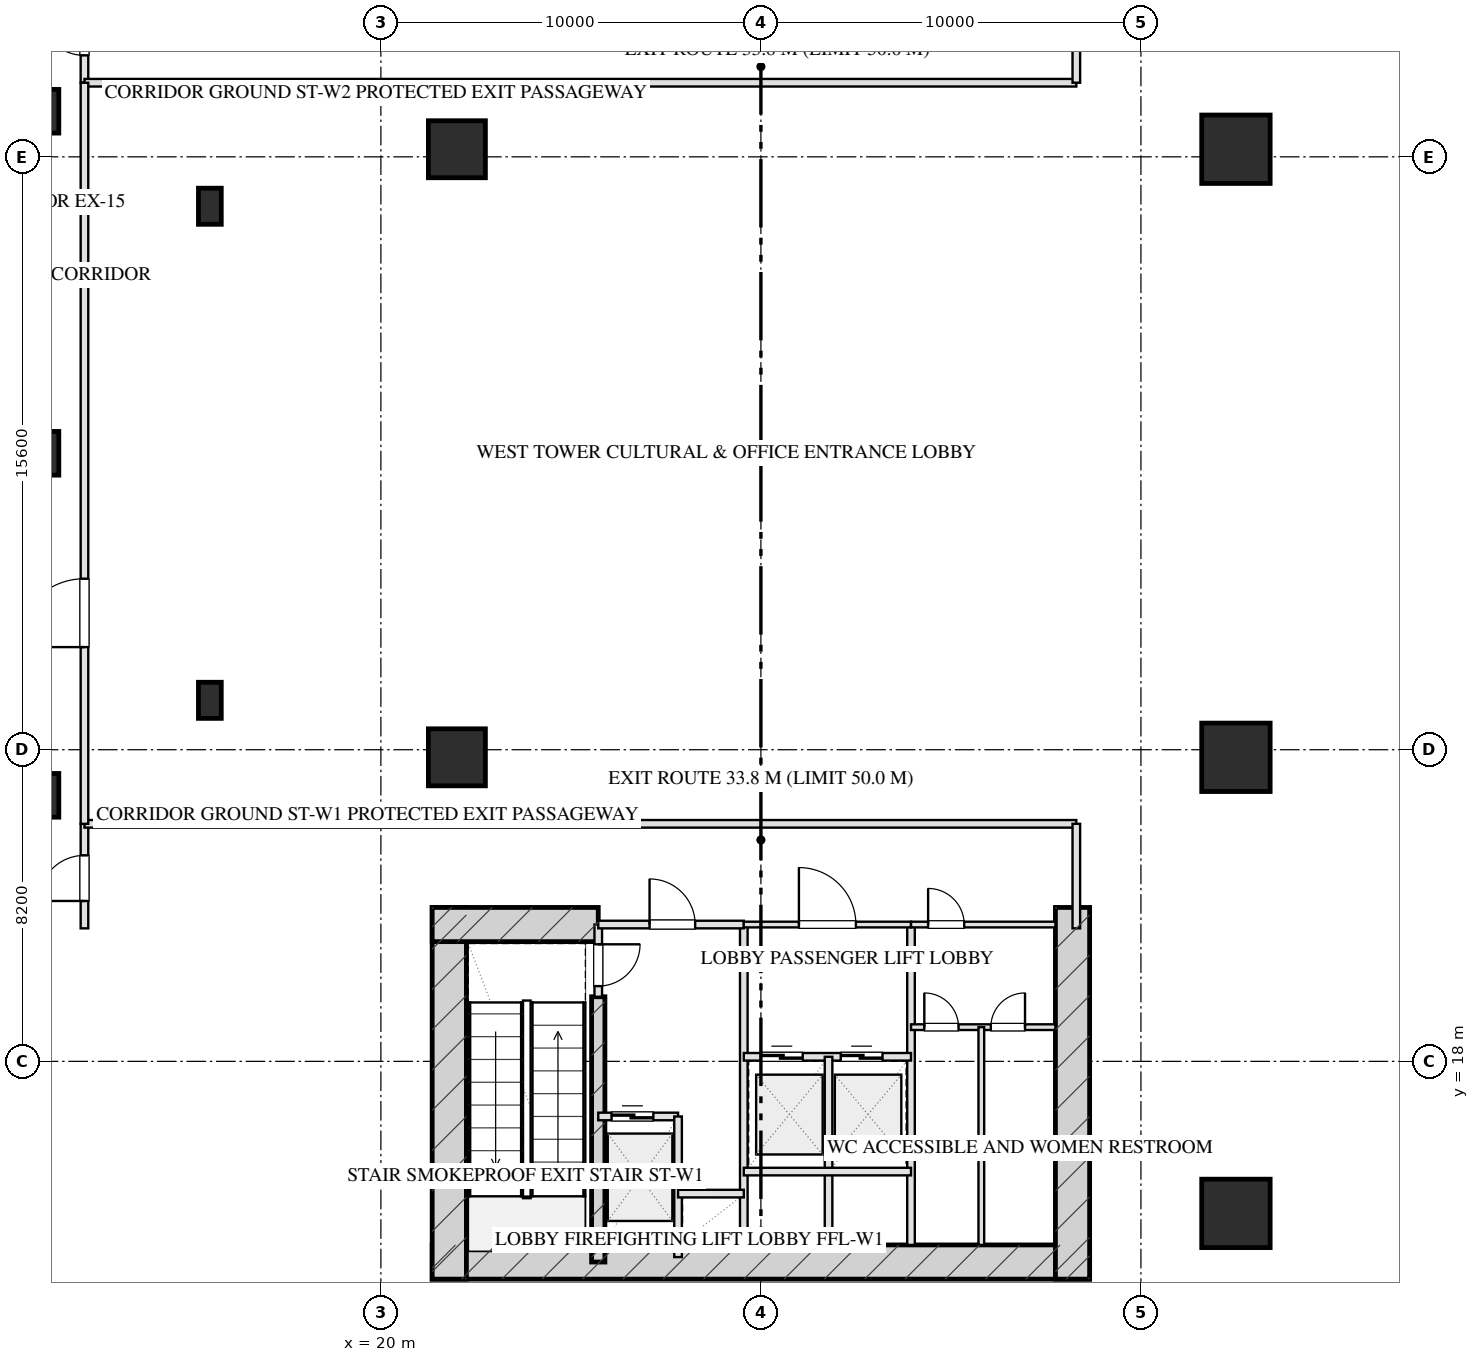
"""IFC4 building model, lengths in metres.
Left out: names, types, materials, properties, quantities, classifications, styles, units other than length and angle.
Written with IfcOpenShell. Run it as: python <this file> out.ifc"""

import sys

from ifc_helpers import new_model, si_unit, direction, frame, frame_2d, origin, origin_2d, place, context, subcontext, project, spatial, rectangle, hollow_rectangle, extrude, element, fill, save


model = new_model("IFC4")
c1 = context("Model", 3, precision=1e-05, world=origin(), true_north=direction((0.0, 1.0)))
c2 = subcontext(c1, "Body", "Model", "MODEL_VIEW")
j1 = project(units=[si_unit("LENGTHUNIT", "METRE"), si_unit("PLANEANGLEUNIT", "RADIAN")], contexts=[c1])
p1 = place(None, origin())
s1 = spatial("IfcSite", under=j1, at=p1, CompositionType="ELEMENT")
p2 = place(p1, origin())
s2 = spatial("IfcBuilding", under=s1, at=p2, CompositionType="ELEMENT")
p3 = place(p2, origin())
s3 = spatial("IfcBuildingStorey", under=s2, at=p3, CompositionType="ELEMENT", Elevation=0.0)
p4 = place(p3, frame((21.35, 12.72, 0.0), z_axis=(0.0, 0.0, 1.0), x_axis=(1.0, 0.0, 0.0)))
e1 = element("IfcWall", 1, at=p4, inside=s3, PredefinedType="SHEAR", context=c2, shape_type="SweptSolid", body=[
    extrude(rectangle(XDim=17.3, YDim=0.9, at=frame_2d((8.65, 0.0))), origin(), (0.0, 0.0, 1.0), 6.0),
])
for number, where, z_axis, x_axis in (
    (2, (21.8, 22.05, 0.0), (0.0, 0.0, 1.0), (0.0, -1.0, 0.0)),
    (3, (38.2, 22.05, 0.0), (0.0, 0.0, 1.0), (0.0, -1.0, 0.0)),
):
    element("IfcWall", number, at=place(p3, frame(where, z_axis=z_axis, x_axis=x_axis)), inside=s3, PredefinedType="SHEAR", context=c2, shape_type="SweptSolid", body=[
        extrude(rectangle(XDim=9.78, YDim=0.9, at=frame_2d((4.89, 0.0))), origin(), (0.0, 0.0, 1.0), 6.0),
    ])
p5 = place(p3, frame((25.72, 19.7, 0.0), z_axis=(0.0, 0.0, 1.0), x_axis=(0.0, -1.0, 0.0)))
e4 = element("IfcWall", 4, at=p5, inside=s3, PredefinedType="SHEAR", context=c2, shape_type="SweptSolid", body=[
    extrude(rectangle(XDim=6.98, YDim=0.35, at=frame_2d((3.49, 0.0))), origin(), (0.0, 0.0, 1.0), 6.0),
])
p6 = place(p3, frame((21.35, 21.6, 0.0), z_axis=(0.0, 0.0, 1.0), x_axis=(1.0, 0.0, 0.0)))
e5 = element("IfcWall", 5, at=p6, inside=s3, PredefinedType="SHEAR", context=c2, shape_type="SweptSolid", body=[
    extrude(rectangle(XDim=4.37, YDim=0.9, at=frame_2d((2.185, 0.0))), origin(), (0.0, 0.0, 1.0), 6.0),
])
for number, where, z_axis, x_axis in (
    (6, (22.0, 26.0, 0.0), (0.0, 0.0, 1.0), (1.0, 0.0, 0.0)),
    (7, (22.0, 42.0, 0.0), (0.0, 0.0, 1.0), (1.0, 0.0, 0.0)),
):
    element("IfcColumn", number, at=place(p3, frame(where, z_axis=z_axis, x_axis=x_axis)), inside=s3, PredefinedType="COLUMN", context=c2, shape_type="SweptSolid", body=[
        extrude(rectangle(XDim=1.5, YDim=1.5, at=origin_2d()), origin(), (0.0, 0.0, 1.0), 6.001),
    ])
for number, where, z_axis, x_axis in (
    (8, (42.5, 14.0, 0.0), (0.0, 0.0, 1.0), (1.0, 0.0, 0.0)),
    (9, (42.5, 26.0, 0.0), (0.0, 0.0, 1.0), (1.0, 0.0, 0.0)),
    (10, (42.5, 42.0, 0.0), (0.0, 0.0, 1.0), (1.0, 0.0, 0.0)),
):
    element("IfcColumn", number, at=place(p3, frame(where, z_axis=z_axis, x_axis=x_axis)), inside=s3, PredefinedType="COLUMN", context=c2, shape_type="SweptSolid", body=[
        extrude(hollow_rectangle(XDim=1.8, YDim=1.8, WallThickness=0.06, at=origin_2d()), origin(), (0.0, 0.0, 1.0), 6.001),
    ])
for number, where, z_axis, x_axis in (
    (11, (10.95, 25.0, 0.0), (0.0, 0.0, 1.0), (1.0, 0.0, 0.0)),
    (12, (10.95, 34.0, 0.0), (0.0, 0.0, 1.0), (1.0, 0.0, 0.0)),
    (13, (10.95, 43.0, 0.0), (0.0, 0.0, 1.0), (1.0, 0.0, 0.0)),
):
    element("IfcColumn", number, at=place(p3, frame(where, z_axis=z_axis, x_axis=x_axis)), inside=s3, PredefinedType="COLUMN", context=c2, shape_type="SweptSolid", body=[
        extrude(hollow_rectangle(XDim=1.15, YDim=1.15, WallThickness=0.04, at=origin_2d()), origin(), (0.0, 0.0, 1.0), 6.001),
    ])
for number, where, z_axis, x_axis in (
    (14, (15.5, 27.5, 0.0), (0.0, 0.0, 1.0), (1.0, 0.0, 0.0)),
    (15, (15.5, 40.5, 0.0), (0.0, 0.0, 1.0), (1.0, 0.0, 0.0)),
):
    element("IfcColumn", number, at=place(p3, frame(where, z_axis=z_axis, x_axis=x_axis)), inside=s3, PredefinedType="PILASTER", context=c2, shape_type="SweptSolid", body=[
        extrude(rectangle(XDim=0.6, YDim=0.95, at=origin_2d()), origin(), (0.0, 0.0, 1.0), 6.001),
    ])
p7 = place(p3, frame((25.72, 21.6, 0.0), z_axis=(0.0, 0.0, 1.0), x_axis=(0.0, -1.0, 0.0)))
e16 = element("IfcWall", 16, at=p7, inside=s3, PredefinedType="PARTITIONING", context=c2, shape_type="SweptSolid", body=[
    extrude(rectangle(XDim=1.9, YDim=0.2, at=frame_2d((0.95, 0.0))), origin(), (0.0, 0.0, 1.0), 5.685),
])
p8 = place(p7, frame((0.52, 0.0, 0.0)))
e17 = element("IfcOpeningElement", 17, at=p8, cuts=e16, PredefinedType="OPENING", context=c2, shape_type="SweptSolid", body=[
    extrude(rectangle(XDim=1.1, YDim=2.05, at=frame_2d((0.55, 1.025))), frame((0.0, 0.11, 0.0), z_axis=(0.0, -1.0, 0.0), x_axis=(1.0, 0.0, 0.0)), (0.0, 0.0, 1.0), 0.22),
])
p9 = place(p3, frame((29.55, 21.6, 0.0), z_axis=(0.0, 0.0, 1.0), x_axis=(0.0, -1.0, 0.0)))
e18 = element("IfcWall", 18, at=p9, inside=s3, PredefinedType="PARTITIONING", context=c2, shape_type="SweptSolid", body=[
    extrude(rectangle(XDim=8.43, YDim=0.2, at=frame_2d((4.215, 0.0))), origin(), (0.0, 0.0, 1.0), 5.685),
])
p10 = place(p3, frame((25.72, 21.6, 0.0), z_axis=(0.0, 0.0, 1.0), x_axis=(1.0, 0.0, 0.0)))
e19 = element("IfcWall", 19, at=p10, inside=s3, PredefinedType="PARTITIONING", context=c2, shape_type="SweptSolid", body=[
    extrude(rectangle(XDim=3.83, YDim=0.2, at=frame_2d((1.915, 0.0))), origin(), (0.0, 0.0, 1.0), 5.685),
])
p11 = place(p10, frame((1.35, 0.0, 0.0)))
e20 = element("IfcOpeningElement", 20, at=p11, cuts=e19, PredefinedType="OPENING", context=c2, shape_type="SweptSolid", body=[
    extrude(rectangle(XDim=1.2, YDim=2.05, at=frame_2d((0.6, 1.025))), frame((0.0, 0.11, 0.0), z_axis=(0.0, -1.0, 0.0), x_axis=(1.0, 0.0, 0.0)), (0.0, 0.0, 1.0), 0.22),
])
p12 = place(p3, frame((25.72, 16.55, 0.0), z_axis=(0.0, 0.0, 1.0), x_axis=(1.0, 0.0, 0.0)))
e21 = element("IfcWall", 21, at=p12, inside=s3, PredefinedType="PARTITIONING", context=c2, shape_type="SweptSolid", body=[
    extrude(rectangle(XDim=2.1, YDim=0.2, at=frame_2d((1.05, 0.0))), origin(), (0.0, 0.0, 1.0), 5.685),
])
p13 = place(p12, frame((0.35, 0.0, 0.0)))
e22 = element("IfcOpeningElement", 22, at=p13, cuts=e21, PredefinedType="OPENING", context=c2, shape_type="SweptSolid", body=[
    extrude(rectangle(XDim=1.1, YDim=2.05, at=frame_2d((0.55, 1.025))), frame((0.0, 0.11, 0.0), z_axis=(0.0, -1.0, 0.0), x_axis=(1.0, 0.0, 0.0)), (0.0, 0.0, 1.0), 0.22),
])
p14 = place(p3, frame((27.82, 16.55, 0.0), z_axis=(0.0, 0.0, 1.0), x_axis=(0.0, -1.0, 0.0)))
e23 = element("IfcWall", 23, at=p14, inside=s3, PredefinedType="PARTITIONING", context=c2, shape_type="SweptSolid", body=[
    extrude(rectangle(XDim=3.7, YDim=0.2, at=frame_2d((1.85, 0.0))), origin(), (0.0, 0.0, 1.0), 5.685),
])
p15 = place(p3, frame((27.82, 14.52, 0.0), z_axis=(0.0, 0.0, 1.0), x_axis=(1.0, 0.0, 0.0)))
e24 = element("IfcWall", 24, at=p15, inside=s3, PredefinedType="PARTITIONING", context=c2, shape_type="SweptSolid", body=[
    extrude(rectangle(XDim=1.73, YDim=0.2, at=frame_2d((0.865, 0.0))), origin(), (0.0, 0.0, 1.0), 5.685),
])
p16 = place(p3, frame((33.95, 21.6, 0.0), z_axis=(0.0, 0.0, 1.0), x_axis=(0.0, -1.0, 0.0)))
e25 = element("IfcWall", 25, at=p16, inside=s3, PredefinedType="PARTITIONING", context=c2, shape_type="SweptSolid", body=[
    extrude(rectangle(XDim=8.43, YDim=0.2, at=frame_2d((4.215, 0.0))), origin(), (0.0, 0.0, 1.0), 5.685),
])
p17 = place(p3, frame((29.55, 21.6, 0.0), z_axis=(0.0, 0.0, 1.0), x_axis=(1.0, 0.0, 0.0)))
e26 = element("IfcWall", 26, at=p17, inside=s3, PredefinedType="PARTITIONING", context=c2, shape_type="SweptSolid", body=[
    extrude(rectangle(XDim=4.4, YDim=0.15, at=frame_2d((2.2, 0.0))), origin(), (0.0, 0.0, 1.0), 5.685),
])
p18 = place(p17, frame((1.45, 0.0, 0.0)))
e27 = element("IfcOpeningElement", 27, at=p18, cuts=e26, PredefinedType="OPENING", context=c2, shape_type="SweptSolid", body=[
    extrude(rectangle(XDim=1.5, YDim=2.05, at=frame_2d((0.75, 1.025))), frame((0.0, 0.085, 0.0), z_axis=(0.0, -1.0, 0.0), x_axis=(1.0, 0.0, 0.0)), (0.0, 0.0, 1.0), 0.17),
])
p19 = place(p3, frame((29.55, 18.12, 0.0), z_axis=(0.0, 0.0, 1.0), x_axis=(1.0, 0.0, 0.0)))
e28 = element("IfcWall", 28, at=p19, inside=s3, PredefinedType="PARTITIONING", context=c2, shape_type="SweptSolid", body=[
    extrude(rectangle(XDim=4.4, YDim=0.2, at=frame_2d((2.2, 0.0))), origin(), (0.0, 0.0, 1.0), 5.685),
])
p20 = place(p19, frame((0.45, 0.0, 0.0)))
e29 = element("IfcOpeningElement", 29, at=p20, cuts=e28, PredefinedType="OPENING", context=c2, shape_type="SweptSolid", body=[
    extrude(rectangle(XDim=1.1, YDim=2.05, at=frame_2d((0.55, 1.025))), frame((0.0, 0.11, 0.0), z_axis=(0.0, -1.0, 0.0), x_axis=(1.0, 0.0, 0.0)), (0.0, 0.0, 1.0), 0.22),
])
p21 = place(p19, frame((2.55, 0.0, 0.0)))
e30 = element("IfcOpeningElement", 30, at=p21, cuts=e28, PredefinedType="OPENING", context=c2, shape_type="SweptSolid", body=[
    extrude(rectangle(XDim=1.1, YDim=2.05, at=frame_2d((0.55, 1.025))), frame((0.0, 0.11, 0.0), z_axis=(0.0, -1.0, 0.0), x_axis=(1.0, 0.0, 0.0)), (0.0, 0.0, 1.0), 0.22),
])
p22 = place(p3, frame((31.78, 18.12, 0.0), z_axis=(0.0, 0.0, 1.0), x_axis=(0.0, -1.0, 0.0)))
e31 = element("IfcWall", 31, at=p22, inside=s3, PredefinedType="PARTITIONING", context=c2, shape_type="SweptSolid", body=[
    extrude(rectangle(XDim=4.95, YDim=0.2, at=frame_2d((2.475, 0.0))), origin(), (0.0, 0.0, 1.0), 5.685),
])
p23 = place(p3, frame((29.55, 15.1, 0.0), z_axis=(0.0, 0.0, 1.0), x_axis=(1.0, 0.0, 0.0)))
e32 = element("IfcWall", 32, at=p23, inside=s3, PredefinedType="PARTITIONING", context=c2, shape_type="SweptSolid", body=[
    extrude(rectangle(XDim=4.4, YDim=0.2, at=frame_2d((2.2, 0.0))), origin(), (0.0, 0.0, 1.0), 5.685),
])
p24 = place(p3, frame((33.95, 21.6, 0.0), z_axis=(0.0, 0.0, 1.0), x_axis=(1.0, 0.0, 0.0)))
e33 = element("IfcWall", 33, at=p24, inside=s3, PredefinedType="PARTITIONING", context=c2, shape_type="SweptSolid", body=[
    extrude(rectangle(XDim=3.8, YDim=0.15, at=frame_2d((1.9, 0.0))), origin(), (0.0, 0.0, 1.0), 5.685),
])
p25 = place(p24, frame((0.45, 0.0, 0.0)))
e34 = element("IfcOpeningElement", 34, at=p25, cuts=e33, PredefinedType="OPENING", context=c2, shape_type="SweptSolid", body=[
    extrude(rectangle(XDim=0.95, YDim=2.05, at=frame_2d((0.475, 1.025))), frame((0.0, 0.085, 0.0), z_axis=(0.0, -1.0, 0.0), x_axis=(1.0, 0.0, 0.0)), (0.0, 0.0, 1.0), 0.17),
])
p26 = place(p3, frame((33.95, 18.9, 0.0), z_axis=(0.0, 0.0, 1.0), x_axis=(1.0, 0.0, 0.0)))
e35 = element("IfcWall", 35, at=p26, inside=s3, PredefinedType="PARTITIONING", context=c2, shape_type="SweptSolid", body=[
    extrude(rectangle(XDim=3.8, YDim=0.15, at=frame_2d((1.9, 0.0))), origin(), (0.0, 0.0, 1.0), 5.685),
])
p27 = place(p26, frame((0.35, 0.0, 0.0)))
e36 = element("IfcOpeningElement", 36, at=p27, cuts=e35, PredefinedType="OPENING", context=c2, shape_type="SweptSolid", body=[
    extrude(rectangle(XDim=0.9, YDim=2.05, at=frame_2d((0.45, 1.025))), frame((0.0, 0.085, 0.0), z_axis=(0.0, -1.0, 0.0), x_axis=(1.0, 0.0, 0.0)), (0.0, 0.0, 1.0), 0.17),
])
p28 = place(p26, frame((2.1, 0.0, 0.0)))
e37 = element("IfcOpeningElement", 37, at=p28, cuts=e35, PredefinedType="OPENING", context=c2, shape_type="SweptSolid", body=[
    extrude(rectangle(XDim=0.9, YDim=2.05, at=frame_2d((0.45, 1.025))), frame((0.0, 0.085, 0.0), z_axis=(0.0, -1.0, 0.0), x_axis=(1.0, 0.0, 0.0)), (0.0, 0.0, 1.0), 0.17),
])
p29 = place(p3, frame((35.8, 18.9, 0.0), z_axis=(0.0, 0.0, 1.0), x_axis=(0.0, -1.0, 0.0)))
e38 = element("IfcWall", 38, at=p29, inside=s3, PredefinedType="PARTITIONING", context=c2, shape_type="SweptSolid", body=[
    extrude(rectangle(XDim=5.73, YDim=0.15, at=frame_2d((2.865, 0.0))), origin(), (0.0, 0.0, 1.0), 5.685),
])
p30 = place(p3, frame((12.2, 21.5, 0.0), z_axis=(0.0, 0.0, 1.0), x_axis=(0.0, 1.0, 0.0)))
e39 = element("IfcWall", 39, at=p30, inside=s3, PredefinedType="PARTITIONING", context=c2, shape_type="SweptSolid", body=[
    extrude(rectangle(XDim=2.75, YDim=0.2, at=frame_2d((1.375, 0.0))), origin(), (0.0, 0.0, 1.0), 5.685),
])
p31 = place(p30, frame((0.72, 0.0, 0.0)))
e40 = element("IfcOpeningElement", 40, at=p31, cuts=e39, PredefinedType="OPENING", context=c2, shape_type="SweptSolid", body=[
    extrude(rectangle(XDim=1.2, YDim=2.05, at=frame_2d((0.6, 1.025))), frame((0.0, 0.11, 0.0), z_axis=(0.0, -1.0, 0.0), x_axis=(1.0, 0.0, 0.0)), (0.0, 0.0, 1.0), 0.22),
])
p32 = place(p3, frame((12.2, 24.25, 0.0), z_axis=(0.0, 0.0, 1.0), x_axis=(1.0, 0.0, 0.0)))
e41 = element("IfcWall", 41, at=p32, inside=s3, PredefinedType="PARTITIONING", context=c2, shape_type="SweptSolid", body=[
    extrude(rectangle(XDim=26.1, YDim=0.2, at=frame_2d((13.05, 0.0))), origin(), (0.0, 0.0, 1.0), 5.685),
])
p33 = place(p3, frame((38.3, 21.5, 0.0), z_axis=(0.0, 0.0, 1.0), x_axis=(0.0, 1.0, 0.0)))
e42 = element("IfcWall", 42, at=p33, inside=s3, PredefinedType="PARTITIONING", context=c2, shape_type="SweptSolid", body=[
    extrude(rectangle(XDim=2.75, YDim=0.2, at=frame_2d((1.375, 0.0))), origin(), (0.0, 0.0, 1.0), 5.685),
])
p34 = place(p3, frame((12.2, 43.75, 0.0), z_axis=(0.0, 0.0, 1.0), x_axis=(0.0, 1.0, 0.0)))
e43 = element("IfcWall", 43, at=p34, inside=s3, PredefinedType="PARTITIONING", context=c2, shape_type="SweptSolid", body=[
    extrude(rectangle(XDim=2.75, YDim=0.2, at=frame_2d((1.375, 0.0))), origin(), (0.0, 0.0, 1.0), 5.685),
])
p35 = place(p34, frame((0.72, 0.0, 0.0)))
e44 = element("IfcOpeningElement", 44, at=p35, cuts=e43, PredefinedType="OPENING", context=c2, shape_type="SweptSolid", body=[
    extrude(rectangle(XDim=1.2, YDim=2.05, at=frame_2d((0.6, 1.025))), frame((0.0, 0.11, 0.0), z_axis=(0.0, -1.0, 0.0), x_axis=(1.0, 0.0, 0.0)), (0.0, 0.0, 1.0), 0.22),
])
p36 = place(p3, frame((12.2, 43.75, 0.0), z_axis=(0.0, 0.0, 1.0), x_axis=(1.0, 0.0, 0.0)))
e45 = element("IfcWall", 45, at=p36, inside=s3, PredefinedType="PARTITIONING", context=c2, shape_type="SweptSolid", body=[
    extrude(rectangle(XDim=26.1, YDim=0.2, at=frame_2d((13.05, 0.0))), origin(), (0.0, 0.0, 1.0), 5.685),
])
p37 = place(p3, frame((38.3, 43.75, 0.0), z_axis=(0.0, 0.0, 1.0), x_axis=(0.0, 1.0, 0.0)))
e46 = element("IfcWall", 46, at=p37, inside=s3, PredefinedType="PARTITIONING", context=c2, shape_type="SweptSolid", body=[
    extrude(rectangle(XDim=2.75, YDim=0.2, at=frame_2d((1.375, 0.0))), origin(), (0.0, 0.0, 1.0), 5.685),
])
p38 = place(p3, frame((12.2, 24.25, 0.0), z_axis=(0.0, 0.0, 1.0), x_axis=(0.0, 1.0, 0.0)))
e47 = element("IfcWall", 47, at=p38, inside=s3, PredefinedType="PARTITIONING", context=c2, shape_type="SweptSolid", body=[
    extrude(rectangle(XDim=19.5, YDim=0.2, at=frame_2d((9.75, 0.0))), origin(), (0.0, 0.0, 1.0), 5.685),
])
p39 = place(p38, frame((4.65, 0.0, 0.0)))
e48 = element("IfcOpeningElement", 48, at=p39, cuts=e47, PredefinedType="OPENING", context=c2, shape_type="SweptSolid", body=[
    extrude(rectangle(XDim=1.8, YDim=2.05, at=frame_2d((0.9, 1.025))), frame((0.0, 0.11, 0.0), z_axis=(0.0, -1.0, 0.0), x_axis=(1.0, 0.0, 0.0)), (0.0, 0.0, 1.0), 0.22),
])
p40 = place(p8, origin())
e49 = element("IfcDoor", 49, at=p40, inside=s3, OperationType="SINGLE_SWING_LEFT", PredefinedType="DOOR", context=c2, shape_type="SweptSolid", body=[
    extrude(rectangle(XDim=1.1, YDim=2.05, at=frame_2d((0.55, 1.025))), frame((0.0, 0.025, 0.0), z_axis=(0.0, -1.0, 0.0), x_axis=(1.0, 0.0, 0.0)), (0.0, 0.0, 1.0), 0.05),
])
fill(e17, e49)
p41 = place(p11, origin())
e50 = element("IfcDoor", 50, at=p41, inside=s3, OperationType="SINGLE_SWING_LEFT", PredefinedType="DOOR", context=c2, shape_type="SweptSolid", body=[
    extrude(rectangle(XDim=1.2, YDim=2.05, at=frame_2d((0.6, 1.025))), frame((0.0, 0.025, 0.0), z_axis=(0.0, -1.0, 0.0), x_axis=(1.0, 0.0, 0.0)), (0.0, 0.0, 1.0), 0.05),
])
fill(e20, e50)
p42 = place(p13, origin())
e51 = element("IfcDoor", 51, at=p42, inside=s3, OperationType="DOUBLE_DOOR_SLIDING", PredefinedType="DOOR", context=c2, shape_type="SweptSolid", body=[
    extrude(rectangle(XDim=1.1, YDim=2.05, at=frame_2d((0.55, 1.025))), frame((0.0, 0.025, 0.0), z_axis=(0.0, -1.0, 0.0), x_axis=(1.0, 0.0, 0.0)), (0.0, 0.0, 1.0), 0.05),
])
fill(e22, e51)
p43 = place(p18, origin())
e52 = element("IfcDoor", 52, at=p43, inside=s3, OperationType="SINGLE_SWING_LEFT", PredefinedType="DOOR", context=c2, shape_type="SweptSolid", body=[
    extrude(rectangle(XDim=1.5, YDim=2.05, at=frame_2d((0.75, 1.025))), frame((0.0, 0.025, 0.0), z_axis=(0.0, -1.0, 0.0), x_axis=(1.0, 0.0, 0.0)), (0.0, 0.0, 1.0), 0.05),
])
fill(e27, e52)
p44 = place(p20, origin())
e53 = element("IfcDoor", 53, at=p44, inside=s3, OperationType="DOUBLE_DOOR_SLIDING", PredefinedType="DOOR", context=c2, shape_type="SweptSolid", body=[
    extrude(rectangle(XDim=1.1, YDim=2.05, at=frame_2d((0.55, 1.025))), frame((0.0, 0.025, 0.0), z_axis=(0.0, -1.0, 0.0), x_axis=(1.0, 0.0, 0.0)), (0.0, 0.0, 1.0), 0.05),
])
fill(e29, e53)
p45 = place(p21, origin())
e54 = element("IfcDoor", 54, at=p45, inside=s3, OperationType="DOUBLE_DOOR_SLIDING", PredefinedType="DOOR", context=c2, shape_type="SweptSolid", body=[
    extrude(rectangle(XDim=1.1, YDim=2.05, at=frame_2d((0.55, 1.025))), frame((0.0, 0.025, 0.0), z_axis=(0.0, -1.0, 0.0), x_axis=(1.0, 0.0, 0.0)), (0.0, 0.0, 1.0), 0.05),
])
fill(e30, e54)
p46 = place(p25, origin())
e55 = element("IfcDoor", 55, at=p46, inside=s3, OperationType="SINGLE_SWING_LEFT", PredefinedType="DOOR", context=c2, shape_type="SweptSolid", body=[
    extrude(rectangle(XDim=0.95, YDim=2.05, at=frame_2d((0.475, 1.025))), frame((0.0, 0.025, 0.0), z_axis=(0.0, -1.0, 0.0), x_axis=(1.0, 0.0, 0.0)), (0.0, 0.0, 1.0), 0.05),
])
fill(e34, e55)
p47 = place(p27, origin())
e56 = element("IfcDoor", 56, at=p47, inside=s3, OperationType="SINGLE_SWING_LEFT", PredefinedType="DOOR", context=c2, shape_type="SweptSolid", body=[
    extrude(rectangle(XDim=0.9, YDim=2.05, at=frame_2d((0.45, 1.025))), frame((0.0, 0.025, 0.0), z_axis=(0.0, -1.0, 0.0), x_axis=(1.0, 0.0, 0.0)), (0.0, 0.0, 1.0), 0.05),
])
fill(e36, e56)
p48 = place(p28, origin())
e57 = element("IfcDoor", 57, at=p48, inside=s3, OperationType="SINGLE_SWING_RIGHT", PredefinedType="DOOR", context=c2, shape_type="SweptSolid", body=[
    extrude(rectangle(XDim=0.9, YDim=2.05, at=frame_2d((0.45, 1.025))), frame((0.0, 0.025, 0.0), z_axis=(0.0, -1.0, 0.0), x_axis=(1.0, 0.0, 0.0)), (0.0, 0.0, 1.0), 0.05),
])
fill(e37, e57)
p49 = place(p31, origin())
e58 = element("IfcDoor", 58, at=p49, inside=s3, OperationType="SINGLE_SWING_LEFT", PredefinedType="DOOR", context=c2, shape_type="SweptSolid", body=[
    extrude(rectangle(XDim=1.2, YDim=2.05, at=frame_2d((0.6, 1.025))), frame((0.0, 0.025, 0.0), z_axis=(0.0, -1.0, 0.0), x_axis=(1.0, 0.0, 0.0)), (0.0, 0.0, 1.0), 0.05),
])
fill(e40, e58)
p50 = place(p35, origin())
e59 = element("IfcDoor", 59, at=p50, inside=s3, OperationType="SINGLE_SWING_RIGHT", PredefinedType="DOOR", context=c2, shape_type="SweptSolid", body=[
    extrude(rectangle(XDim=1.2, YDim=2.05, at=frame_2d((0.6, 1.025))), frame((0.0, 0.025, 0.0), z_axis=(0.0, -1.0, 0.0), x_axis=(1.0, 0.0, 0.0)), (0.0, 0.0, 1.0), 0.05),
])
fill(e44, e59)
p51 = place(p39, origin())
e60 = element("IfcDoor", 60, at=p51, inside=s3, OperationType="SINGLE_SWING_LEFT", PredefinedType="DOOR", context=c2, shape_type="SweptSolid", body=[
    extrude(rectangle(XDim=1.8, YDim=2.05, at=frame_2d((0.9, 1.025))), frame((0.0, 0.025, 0.0), z_axis=(0.0, -1.0, 0.0), x_axis=(1.0, 0.0, 0.0)), (0.0, 0.0, 1.0), 0.05),
])
fill(e48, e60)
save(model, sys.argv[1])
